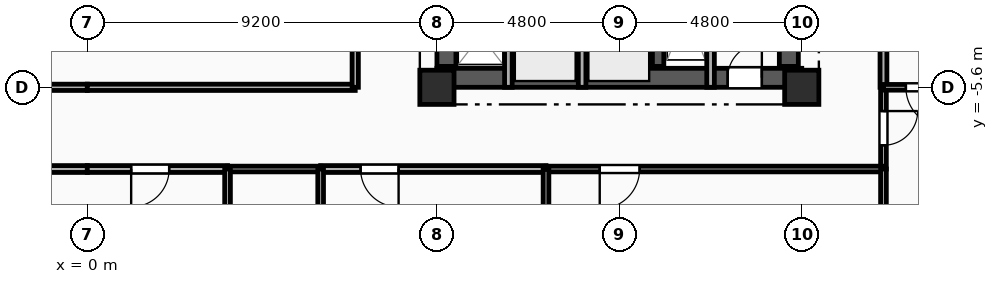
"""IFC4 building model, lengths in metres.
Left out: names, types, materials, properties, quantities, classifications, styles, units other than length and angle.
Written with IfcOpenShell. Run it as: python <this file> out.ifc"""

import sys

from ifc_helpers import new_model, si_unit, direction, frame, frame_2d, origin, origin_2d, place, context, subcontext, project, spatial, rectangle, extrude, element, fill, save


model = new_model("IFC4")
c1 = context("Model", 3, precision=1e-05, world=origin(), true_north=direction((0.0, 1.0)))
c2 = subcontext(c1, "Body", "Model", "MODEL_VIEW")
j1 = project(units=[si_unit("LENGTHUNIT", "METRE"), si_unit("PLANEANGLEUNIT", "RADIAN")], contexts=[c1])
p1 = place(None, origin())
s1 = spatial("IfcSite", under=j1, at=p1, CompositionType="ELEMENT")
p2 = place(p1, origin())
s2 = spatial("IfcBuilding", under=s1, at=p2, CompositionType="ELEMENT")
p3 = place(p2, frame((0.0, 0.0, 137.7)))
s3 = spatial("IfcBuildingStorey", under=s2, at=p3, CompositionType="ELEMENT", Elevation=137.7)
for number, where, z_axis, x_axis in (
    (1, (9.2, -5.6, 0.0), (0.0, 0.0, 1.0), (1.0, 0.0, 0.0)),
    (2, (18.8, -5.6, 0.0), (0.0, 0.0, 1.0), (1.0, 0.0, 0.0)),
):
    element("IfcColumn", number, at=place(p3, frame(where, z_axis=z_axis, x_axis=x_axis)), inside=s3, PredefinedType="COLUMN", context=c2, shape_type="SweptSolid", body=[
        extrude(rectangle(XDim=0.9, YDim=0.9, at=origin_2d()), origin(), (0.0, 0.0, 1.0), 3.35),
    ])
p4 = place(p3, frame((9.2, -5.35, 0.0), z_axis=(0.0, 0.0, 1.0), x_axis=(1.0, 0.0, 0.0)))
e3 = element("IfcWall", 3, at=p4, inside=s3, PredefinedType="SHEAR", context=c2, shape_type="SweptSolid", body=[
    extrude(rectangle(XDim=9.6, YDim=0.5, at=frame_2d((4.8, 0.0))), origin(), (0.0, 0.0, 1.0), 3.04),
])
p5 = place(p4, frame((7.65, 0.0, 0.0)))
e4 = element("IfcOpeningElement", 4, at=p5, cuts=e3, PredefinedType="OPENING", context=c2, shape_type="SweptSolid", body=[
    extrude(rectangle(XDim=0.9, YDim=2.1, at=frame_2d((0.45, 1.05))), frame((0.0, 0.26, 0.0), z_axis=(0.0, -1.0, 0.0), x_axis=(1.0, 0.0, 0.0)), (0.0, 0.0, 1.0), 0.52),
])
p6 = place(p3, frame((9.45, -5.05, 0.0), z_axis=(0.0, 0.0, 1.0), x_axis=(0.0, 1.0, 0.0)))
e5 = element("IfcWall", 5, at=p6, inside=s3, PredefinedType="SHEAR", context=c2, shape_type="SweptSolid", body=[
    extrude(rectangle(XDim=10.1, YDim=0.5, at=frame_2d((5.05, 0.0))), origin(), (0.0, 0.0, 1.0), 3.04),
])
p7 = place(p6, frame((7.15, 0.0, 0.0)))
e6 = element("IfcOpeningElement", 6, at=p7, cuts=e5, PredefinedType="OPENING", context=c2, shape_type="SweptSolid", body=[
    extrude(rectangle(XDim=0.9, YDim=2.1, at=frame_2d((0.45, 1.05))), frame((0.0, 0.26, 0.0), z_axis=(0.0, -1.0, 0.0), x_axis=(1.0, 0.0, 0.0)), (0.0, 0.0, 1.0), 0.52),
])
p8 = place(p6, frame((2.4, 0.0, 0.0)))
e7 = element("IfcOpeningElement", 7, at=p8, cuts=e5, PredefinedType="OPENING", context=c2, shape_type="SweptSolid", body=[
    extrude(rectangle(XDim=1.2, YDim=2.15, at=frame_2d((0.6, 1.075))), frame((0.0, 0.26, 0.0), z_axis=(0.0, -1.0, 0.0), x_axis=(1.0, 0.0, 0.0)), (0.0, 0.0, 1.0), 0.52),
])
p9 = place(p3, frame((18.46, -5.05, 0.0), z_axis=(0.0, 0.0, 1.0), x_axis=(0.0, 1.0, 0.0)))
e8 = element("IfcWall", 8, at=p9, inside=s3, PredefinedType="SHEAR", context=c2, shape_type="SweptSolid", body=[
    extrude(rectangle(XDim=10.1, YDim=0.5, at=frame_2d((5.05, 0.0))), origin(), (0.0, 0.0, 1.0), 3.04),
])
p10 = place(p3, frame((15.02, -5.05, 0.0), z_axis=(0.0, 0.0, 1.0), x_axis=(0.0, 1.0, 0.0)))
e9 = element("IfcWall", 9, at=p10, inside=s3, PredefinedType="SHEAR", context=c2, shape_type="SweptSolid", body=[
    extrude(rectangle(XDim=10.1, YDim=0.3, at=frame_2d((5.05, 0.0))), origin(), (0.0, 0.0, 1.0), 3.04),
])
p11 = place(p3, frame((16.4, -2.11, 0.0), z_axis=(0.0, 0.0, 1.0), x_axis=(0.0, -1.0, 0.0)))
e10 = element("IfcWall", 10, at=p11, inside=s3, PredefinedType="PARTITIONING", context=c2, shape_type="SweptSolid", body=[
    extrude(rectangle(XDim=3.49, YDim=0.2, at=frame_2d((1.745, 0.0))), origin(), (0.0, 0.0, 1.0), 3.04),
])
for number, where, z_axis, x_axis in (
    (11, (11.08, -5.6, 0.0), (0.0, 0.0, 1.0), (0.0, 1.0, 0.0)),
    (12, (13.02, -5.6, 0.0), (0.0, 0.0, 1.0), (0.0, 1.0, 0.0)),
):
    element("IfcWall", number, at=place(p3, frame(where, z_axis=z_axis, x_axis=x_axis)), inside=s3, PredefinedType="PARTITIONING", context=c2, shape_type="SweptSolid", body=[
        extrude(rectangle(XDim=2.25, YDim=0.2, at=frame_2d((1.125, 0.0))), origin(), (0.0, 0.0, 1.0), 3.04),
    ])
p12 = place(p3, frame((0.0, -7.75, 0.0), z_axis=(0.0, 0.0, 1.0), x_axis=(-1.0, 0.0, 0.0)))
e13 = element("IfcWall", 13, at=p12, inside=s3, PredefinedType="PARTITIONING", context=c2, shape_type="SweptSolid", body=[
    extrude(rectangle(XDim=2.24, YDim=0.18, at=frame_2d((1.12, 0.0))), origin(), (0.0, 0.0, 1.0), 3.04),
])
p13 = place(p3, frame((-7.05, -5.6, 0.0), z_axis=(0.0, 0.0, 1.0), x_axis=(1.0, 0.0, 0.0)))
e14 = element("IfcWall", 14, at=p13, inside=s3, PredefinedType="PARTITIONING", context=c2, shape_type="SweptSolid", body=[
    extrude(rectangle(XDim=7.05, YDim=0.165, at=frame_2d((3.525, 0.0))), origin(), (0.0, 0.0, 1.0), 2.525),
])
p14 = place(p3, frame((20.95, -5.6, 0.0), z_axis=(0.0, 0.0, 1.0), x_axis=(0.0, -1.0, 0.0)))
e15 = element("IfcWall", 15, at=p14, inside=s3, PredefinedType="PARTITIONING", context=c2, shape_type="SweptSolid", body=[
    extrude(rectangle(XDim=2.15, YDim=0.15, at=frame_2d((1.075, 0.0))), origin(), (0.0, 0.0, 1.0), 3.04),
])
p15 = place(p14, frame((0.625, 0.0, 0.0)))
e16 = element("IfcOpeningElement", 16, at=p15, cuts=e15, PredefinedType="OPENING", context=c2, shape_type="SweptSolid", body=[
    extrude(rectangle(XDim=0.9, YDim=2.1, at=frame_2d((0.45, 1.05))), frame((0.0, 0.085, 0.0), z_axis=(0.0, -1.0, 0.0), x_axis=(1.0, 0.0, 0.0)), (0.0, 0.0, 1.0), 0.17),
])
p16 = place(p3, frame((3.69, -7.75, 0.0), z_axis=(0.0, 0.0, 1.0), x_axis=(-1.0, 0.0, 0.0)))
e17 = element("IfcWall", 17, at=p16, inside=s3, PredefinedType="PARTITIONING", context=c2, shape_type="SweptSolid", body=[
    extrude(rectangle(XDim=3.69, YDim=0.18, at=frame_2d((1.845, 0.0))), origin(), (0.0, 0.0, 1.0), 3.04),
])
p17 = place(p16, frame((1.536, 0.0, 0.0)))
e18 = element("IfcOpeningElement", 18, at=p17, cuts=e17, PredefinedType="OPENING", context=c2, shape_type="SweptSolid", body=[
    extrude(rectangle(XDim=1.0, YDim=2.15, at=frame_2d((0.5, 1.075))), frame((0.0, 0.1, 0.0), z_axis=(0.0, -1.0, 0.0), x_axis=(1.0, 0.0, 0.0)), (0.0, 0.0, 1.0), 0.2),
])
p18 = place(p3, frame((12.07, -7.75, 0.0), z_axis=(0.0, 0.0, 1.0), x_axis=(-1.0, 0.0, 0.0)))
e19 = element("IfcWall", 19, at=p18, inside=s3, PredefinedType="PARTITIONING", context=c2, shape_type="SweptSolid", body=[
    extrude(rectangle(XDim=5.93, YDim=0.18, at=frame_2d((2.965, 0.0))), origin(), (0.0, 0.0, 1.0), 3.04),
])
p19 = place(p18, frame((3.879, 0.0, 0.0)))
e20 = element("IfcOpeningElement", 20, at=p19, cuts=e19, PredefinedType="OPENING", context=c2, shape_type="SweptSolid", body=[
    extrude(rectangle(XDim=1.0, YDim=2.15, at=frame_2d((0.5, 1.075))), frame((0.0, 0.1, 0.0), z_axis=(0.0, -1.0, 0.0), x_axis=(1.0, 0.0, 0.0)), (0.0, 0.0, 1.0), 0.2),
])
p20 = place(p3, frame((6.14, -7.75, 0.0), z_axis=(0.0, 0.0, 1.0), x_axis=(-1.0, 0.0, 0.0)))
e21 = element("IfcWall", 21, at=p20, inside=s3, PredefinedType="PLUMBINGWALL", context=c2, shape_type="SweptSolid", body=[
    extrude(rectangle(XDim=2.45, YDim=0.15, at=frame_2d((1.225, 0.0))), origin(), (0.0, 0.0, 1.0), 3.04),
])
p21 = place(p3, frame((20.95, -7.75, 0.0), z_axis=(0.0, 0.0, 1.0), x_axis=(-1.0, 0.0, 0.0)))
e22 = element("IfcWall", 22, at=p21, inside=s3, PredefinedType="PARTITIONING", context=c2, shape_type="SweptSolid", body=[
    extrude(rectangle(XDim=8.88, YDim=0.15, at=frame_2d((4.44, 0.0))), origin(), (0.0, 0.0, 1.0), 3.04),
])
p22 = place(p21, frame((6.416, 0.0, 0.0)))
e23 = element("IfcOpeningElement", 23, at=p22, cuts=e22, PredefinedType="OPENING", context=c2, shape_type="SweptSolid", body=[
    extrude(rectangle(XDim=1.05, YDim=2.15, at=frame_2d((0.525, 1.075))), frame((0.0, 0.085, 0.0), z_axis=(0.0, -1.0, 0.0), x_axis=(1.0, 0.0, 0.0)), (0.0, 0.0, 1.0), 0.17),
])
p23 = place(p3, frame((0.0, -5.6, 0.0), z_axis=(0.0, 0.0, 1.0), x_axis=(1.0, 0.0, 0.0)))
e24 = element("IfcWall", 24, at=p23, inside=s3, PredefinedType="PARTITIONING", context=c2, shape_type="SweptSolid", body=[
    extrude(rectangle(XDim=7.05, YDim=0.165, at=frame_2d((3.525, 0.0))), origin(), (0.0, 0.0, 1.0), 2.525),
])
p24 = place(p3, frame((20.95, 8.5, 0.0), z_axis=(0.0, 0.0, 1.0), x_axis=(0.0, -1.0, 0.0)))
e25 = element("IfcWall", 25, at=p24, inside=s3, PredefinedType="PARTITIONING", context=c2, shape_type="SweptSolid", body=[
    extrude(rectangle(XDim=14.1, YDim=0.18, at=frame_2d((7.05, 0.0))), origin(), (0.0, 0.0, 1.0), 3.04),
])
p25 = place(p24, frame((8.042, 0.0, 0.0)))
e26 = element("IfcOpeningElement", 26, at=p25, cuts=e25, PredefinedType="OPENING", context=c2, shape_type="SweptSolid", body=[
    extrude(rectangle(XDim=1.0, YDim=2.15, at=frame_2d((0.5, 1.075))), frame((0.0, 0.1, 0.0), z_axis=(0.0, -1.0, 0.0), x_axis=(1.0, 0.0, 0.0)), (0.0, 0.0, 1.0), 0.2),
])
p26 = place(p3, frame((7.05, -5.6, 0.0), z_axis=(0.0, 0.0, 1.0), x_axis=(0.0, 1.0, 0.0)))
e27 = element("IfcWall", 27, at=p26, inside=s3, PredefinedType="PARTITIONING", context=c2, shape_type="SweptSolid", body=[
    extrude(rectangle(XDim=2.65, YDim=0.165, at=frame_2d((1.325, 0.0))), origin(), (0.0, 0.0, 1.0), 3.04),
])
p27 = place(p3, frame((23.18, -5.6, 0.0), z_axis=(0.0, 0.0, 1.0), x_axis=(-1.0, 0.0, 0.0)))
e28 = element("IfcWall", 28, at=p27, inside=s3, PredefinedType="PARTITIONING", context=c2, shape_type="SweptSolid", body=[
    extrude(rectangle(XDim=2.23, YDim=0.15, at=frame_2d((1.115, 0.0))), origin(), (0.0, 0.0, 1.0), 3.04),
])
p28 = place(p27, frame((0.59, 0.0, 0.0)))
e29 = element("IfcOpeningElement", 29, at=p28, cuts=e28, PredefinedType="OPENING", context=c2, shape_type="SweptSolid", body=[
    extrude(rectangle(XDim=1.05, YDim=2.15, at=frame_2d((0.525, 1.075))), frame((0.0, 0.085, 0.0), z_axis=(0.0, -1.0, 0.0), x_axis=(1.0, 0.0, 0.0)), (0.0, 0.0, 1.0), 0.17),
])
p29 = place(p3, frame((20.95, -15.6, 0.0), z_axis=(0.0, 0.0, 1.0), x_axis=(0.0, 1.0, 0.0)))
e30 = element("IfcWall", 30, at=p29, inside=s3, PredefinedType="PARTITIONING", context=c2, shape_type="SweptSolid", body=[
    extrude(rectangle(XDim=7.85, YDim=0.15, at=frame_2d((3.925, 0.0))), origin(), (0.0, 0.0, 1.0), 3.04),
])
for number, where, z_axis, x_axis in (
    (31, (3.69, -7.75, 0.0), (0.0, 0.0, 1.0), (0.0, -1.0, 0.0)),
    (32, (6.14, -9.9, 0.0), (0.0, 0.0, 1.0), (0.0, 1.0, 0.0)),
):
    element("IfcWall", number, at=place(p3, frame(where, z_axis=z_axis, x_axis=x_axis)), inside=s3, PredefinedType="PLUMBINGWALL", context=c2, shape_type="SweptSolid", body=[
        extrude(rectangle(XDim=2.15, YDim=0.15, at=frame_2d((1.075, 0.0))), origin(), (0.0, 0.0, 1.0), 3.04),
    ])
p30 = place(p3, frame((12.07, -7.75, 0.0), z_axis=(0.0, 0.0, 1.0), x_axis=(0.0, -1.0, 0.0)))
e33 = element("IfcWall", 33, at=p30, inside=s3, PredefinedType="PARTITIONING", context=c2, shape_type="SweptSolid", body=[
    extrude(rectangle(XDim=7.85, YDim=0.15, at=frame_2d((3.925, 0.0))), origin(), (0.0, 0.0, 1.0), 3.04),
])
p31 = place(p5, origin())
e34 = element("IfcDoor", 34, at=p31, inside=s3, OperationType="SINGLE_SWING_RIGHT", PredefinedType="DOOR", context=c2, shape_type="SweptSolid", body=[
    extrude(rectangle(XDim=0.9, YDim=2.1, at=frame_2d((0.45, 1.05))), frame((0.0, 0.025, 0.0), z_axis=(0.0, -1.0, 0.0), x_axis=(1.0, 0.0, 0.0)), (0.0, 0.0, 1.0), 0.05),
])
fill(e4, e34)
p32 = place(p15, origin())
e35 = element("IfcDoor", 35, at=p32, inside=s3, OperationType="SINGLE_SWING_LEFT", PredefinedType="DOOR", context=c2, shape_type="SweptSolid", body=[
    extrude(rectangle(XDim=0.9, YDim=2.1, at=frame_2d((0.45, 1.05))), frame((0.0, 0.025, 0.0), z_axis=(0.0, -1.0, 0.0), x_axis=(1.0, 0.0, 0.0)), (0.0, 0.0, 1.0), 0.05),
])
fill(e16, e35)
p33 = place(p17, origin())
e36 = element("IfcDoor", 36, at=p33, inside=s3, OperationType="SINGLE_SWING_RIGHT", PredefinedType="DOOR", context=c2, shape_type="SweptSolid", body=[
    extrude(rectangle(XDim=1.0, YDim=2.15, at=frame_2d((0.5, 1.075))), frame((0.0, 0.025, 0.0), z_axis=(0.0, -1.0, 0.0), x_axis=(1.0, 0.0, 0.0)), (0.0, 0.0, 1.0), 0.05),
])
fill(e18, e36)
p34 = place(p19, origin())
e37 = element("IfcDoor", 37, at=p34, inside=s3, OperationType="SINGLE_SWING_LEFT", PredefinedType="DOOR", context=c2, shape_type="SweptSolid", body=[
    extrude(rectangle(XDim=1.0, YDim=2.15, at=frame_2d((0.5, 1.075))), frame((0.0, 0.025, 0.0), z_axis=(0.0, -1.0, 0.0), x_axis=(1.0, 0.0, 0.0)), (0.0, 0.0, 1.0), 0.05),
])
fill(e20, e37)
p35 = place(p22, origin())
e38 = element("IfcDoor", 38, at=p35, inside=s3, OperationType="SINGLE_SWING_RIGHT", PredefinedType="DOOR", context=c2, shape_type="SweptSolid", body=[
    extrude(rectangle(XDim=1.05, YDim=2.15, at=frame_2d((0.525, 1.075))), frame((0.0, 0.025, 0.0), z_axis=(0.0, -1.0, 0.0), x_axis=(1.0, 0.0, 0.0)), (0.0, 0.0, 1.0), 0.05),
])
fill(e23, e38)
p36 = place(p28, origin())
e39 = element("IfcDoor", 39, at=p36, inside=s3, OperationType="SINGLE_SWING_LEFT", PredefinedType="DOOR", context=c2, shape_type="SweptSolid", body=[
    extrude(rectangle(XDim=1.05, YDim=2.15, at=frame_2d((0.525, 1.075))), frame((0.0, 0.025, 0.0), z_axis=(0.0, -1.0, 0.0), x_axis=(1.0, 0.0, 0.0)), (0.0, 0.0, 1.0), 0.05),
])
fill(e29, e39)
save(model, sys.argv[1])
